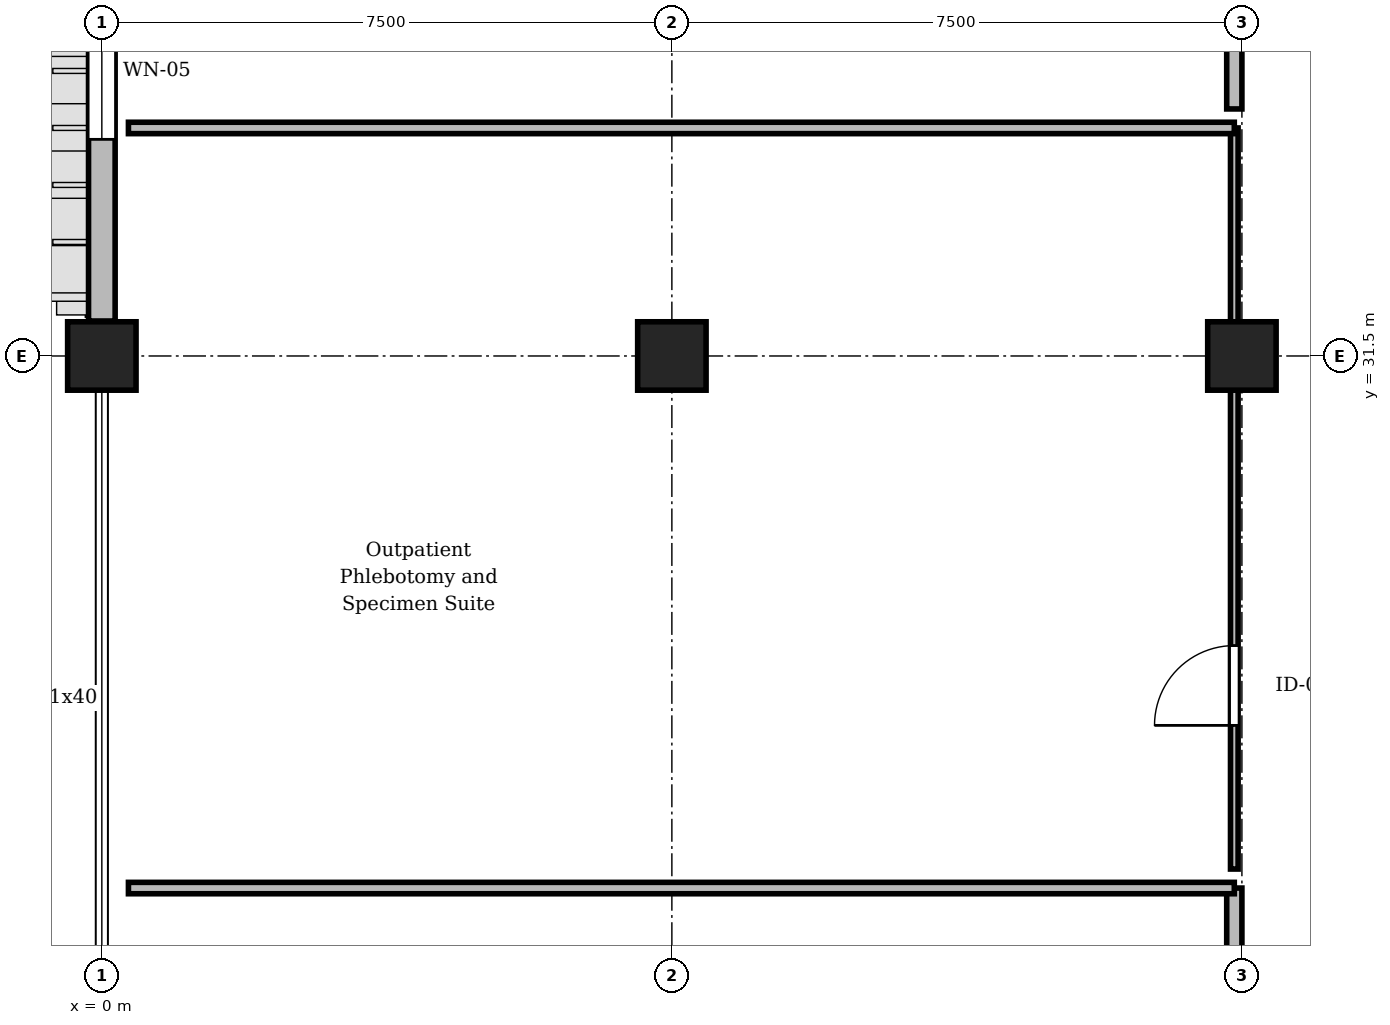
"""IFC4 building model, lengths in metres.
Left out: names, types, materials, properties, quantities, classifications, styles, units other than length and angle.
Written with IfcOpenShell. Run it as: python <this file> out.ifc"""

import sys

from ifc_helpers import new_model, si_unit, direction, frame, frame_2d, origin, origin_2d, place, context, subcontext, project, spatial, rectangle, circle, extrude, element, fill, save


model = new_model("IFC4")
c1 = context("Model", 3, precision=1e-05, world=origin(), true_north=direction((0.0, 1.0)))
c2 = subcontext(c1, "Body", "Model", "MODEL_VIEW")
j1 = project(units=[si_unit("LENGTHUNIT", "METRE"), si_unit("PLANEANGLEUNIT", "RADIAN")], contexts=[c1])
p1 = place(None, origin())
s1 = spatial("IfcSite", under=j1, at=p1, CompositionType="ELEMENT")
p2 = place(p1, origin())
s2 = spatial("IfcBuilding", under=s1, at=p2, CompositionType="ELEMENT")
p3 = place(p2, origin())
s3 = spatial("IfcBuildingStorey", under=s2, at=p3, CompositionType="ELEMENT", Elevation=0.0)
for number, where, z_axis, x_axis in (
    (1, (0.0, 31.5, 0.0), (0.0, 0.0, 1.0), (1.0, 0.0, 0.0)),
    (2, (7.5, 31.5, 0.0), (0.0, 0.0, 1.0), (1.0, 0.0, 0.0)),
):
    element("IfcColumn", number, at=place(p3, frame(where, z_axis=z_axis, x_axis=x_axis)), inside=s3, PredefinedType="COLUMN", context=c2, shape_type="SweptSolid", body=[
        extrude(rectangle(XDim=0.9, YDim=0.9, at=origin_2d()), origin(), (0.0, 0.0, 1.0), 4.8),
    ])
p4 = place(p3, frame((15.0, 31.5, 0.0), z_axis=(0.0, 0.0, 1.0), x_axis=(1.0, 0.0, 0.0)))
e3 = element("IfcColumn", 3, at=p4, inside=s3, PredefinedType="COLUMN", context=c2, shape_type="SweptSolid", body=[
    extrude(circle(Radius=0.45, at=origin_2d()), origin(), (0.0, 0.0, 1.0), 4.8),
])
p5 = place(p3, frame((0.0, 31.96, 0.0), z_axis=(0.0, 0.0, 1.0), x_axis=(0.0, 1.0, 0.0)))
e4 = element("IfcWall", 4, at=p5, inside=s3, PredefinedType="STANDARD", context=c2, shape_type="SweptSolid", body=[
    extrude(rectangle(XDim=6.58, YDim=0.35, at=frame_2d((3.29, 0.0))), origin(), (0.0, 0.0, 1.0), 3.9),
])
p6 = place(p5, frame((2.39, 0.0, 0.9)))
e5 = element("IfcOpeningElement", 5, at=p6, cuts=e4, PredefinedType="OPENING", context=c2, shape_type="SweptSolid", body=[
    extrude(rectangle(XDim=1.8, YDim=2.1, at=frame_2d((0.9, 1.05))), frame((0.0, 0.185, 0.0), z_axis=(0.0, -1.0, 0.0), x_axis=(1.0, 0.0, 0.0)), (0.0, 0.0, 1.0), 0.37),
])
p7 = place(p3, frame((14.9, 15.3, 0.0), z_axis=(0.0, 0.0, 1.0), x_axis=(0.0, 1.0, 0.0)))
e6 = element("IfcWall", 6, at=p7, inside=s3, PredefinedType="STANDARD", context=c2, shape_type="SweptSolid", body=[
    extrude(rectangle(XDim=9.2, YDim=0.2, at=frame_2d((4.6, 0.0))), origin(), (0.0, 0.0, 1.0), 3.785),
])
p8 = place(p7, frame((2.545, 0.0, 0.0)))
e7 = element("IfcOpeningElement", 7, at=p8, cuts=e6, PredefinedType="OPENING", context=c2, shape_type="SweptSolid", body=[
    extrude(rectangle(XDim=1.05, YDim=2.2, at=frame_2d((0.525, 1.1))), frame((0.0, 0.11, 0.0), z_axis=(0.0, -1.0, 0.0), x_axis=(1.0, 0.0, 0.0)), (0.0, 0.0, 1.0), 0.22),
])
p9 = place(p3, frame((14.9, 24.75, 0.0), z_axis=(0.0, 0.0, 1.0), x_axis=(0.0, 1.0, 0.0)))
e8 = element("IfcWall", 8, at=p9, inside=s3, PredefinedType="PARTITIONING", context=c2, shape_type="SweptSolid", body=[
    extrude(rectangle(XDim=9.75, YDim=0.1, at=frame_2d((4.875, 0.0))), origin(), (0.0, 0.0, 1.0), 3.785),
])
p10 = place(p9, frame((1.89, 0.0, 0.0)))
e9 = element("IfcOpeningElement", 9, at=p10, cuts=e8, PredefinedType="OPENING", context=c2, shape_type="SweptSolid", body=[
    extrude(rectangle(XDim=1.05, YDim=2.2, at=frame_2d((0.525, 1.1))), frame((0.0, 0.06, 0.0), z_axis=(0.0, -1.0, 0.0), x_axis=(1.0, 0.0, 0.0)), (0.0, 0.0, 1.0), 0.12),
])
p11 = place(p3, frame((14.9, 34.75, 0.0), z_axis=(0.0, 0.0, 1.0), x_axis=(0.0, 1.0, 0.0)))
e10 = element("IfcWall", 10, at=p11, inside=s3, PredefinedType="STANDARD", context=c2, shape_type="SweptSolid", body=[
    extrude(rectangle(XDim=9.75, YDim=0.2, at=frame_2d((4.875, 0.0))), origin(), (0.0, 0.0, 1.0), 3.935),
])
p12 = place(p11, frame((7.63, 0.0, 0.0)))
e11 = element("IfcOpeningElement", 11, at=p12, cuts=e10, PredefinedType="OPENING", context=c2, shape_type="SweptSolid", body=[
    extrude(rectangle(XDim=1.05, YDim=2.2, at=frame_2d((0.525, 1.1))), frame((0.0, 0.11, 0.0), z_axis=(0.0, -1.0, 0.0), x_axis=(1.0, 0.0, 0.0)), (0.0, 0.0, 1.0), 0.22),
])
for number, where, z_axis, x_axis in (
    (12, (0.35, 24.5, 0.0), (0.0, 0.0, 1.0), (1.0, 0.0, 0.0)),
    (13, (0.35, 34.5, 0.0), (0.0, 0.0, 1.0), (1.0, 0.0, 0.0)),
):
    element("IfcWall", number, at=place(p3, frame(where, z_axis=z_axis, x_axis=x_axis)), inside=s3, PredefinedType="PARTITIONING", context=c2, shape_type="SweptSolid", body=[
        extrude(rectangle(XDim=14.55, YDim=0.15, at=frame_2d((7.275, 0.0))), origin(), (0.0, 0.0, 1.0), 4.485),
    ])
p13 = place(p6, origin())
e14 = element("IfcWindow", 14, at=p13, inside=s3, PartitioningType="SINGLE_PANEL", PredefinedType="WINDOW", context=c2, shape_type="SweptSolid", body=[
    extrude(rectangle(XDim=1.8, YDim=2.1, at=frame_2d((0.9, 1.05))), frame((0.0, 0.03, 0.0), z_axis=(0.0, -1.0, 0.0), x_axis=(1.0, 0.0, 0.0)), (0.0, 0.0, 1.0), 0.06),
])
fill(e5, e14)
p14 = place(p10, origin())
e15 = element("IfcDoor", 15, at=p14, inside=s3, OperationType="SINGLE_SWING_LEFT", PredefinedType="DOOR", context=c2, shape_type="SweptSolid", body=[
    extrude(rectangle(XDim=1.05, YDim=2.2, at=frame_2d((0.525, 1.1))), frame((0.0, 0.025, 0.0), z_axis=(0.0, -1.0, 0.0), x_axis=(1.0, 0.0, 0.0)), (0.0, 0.0, 1.0), 0.05),
])
fill(e9, e15)
save(model, sys.argv[1])
